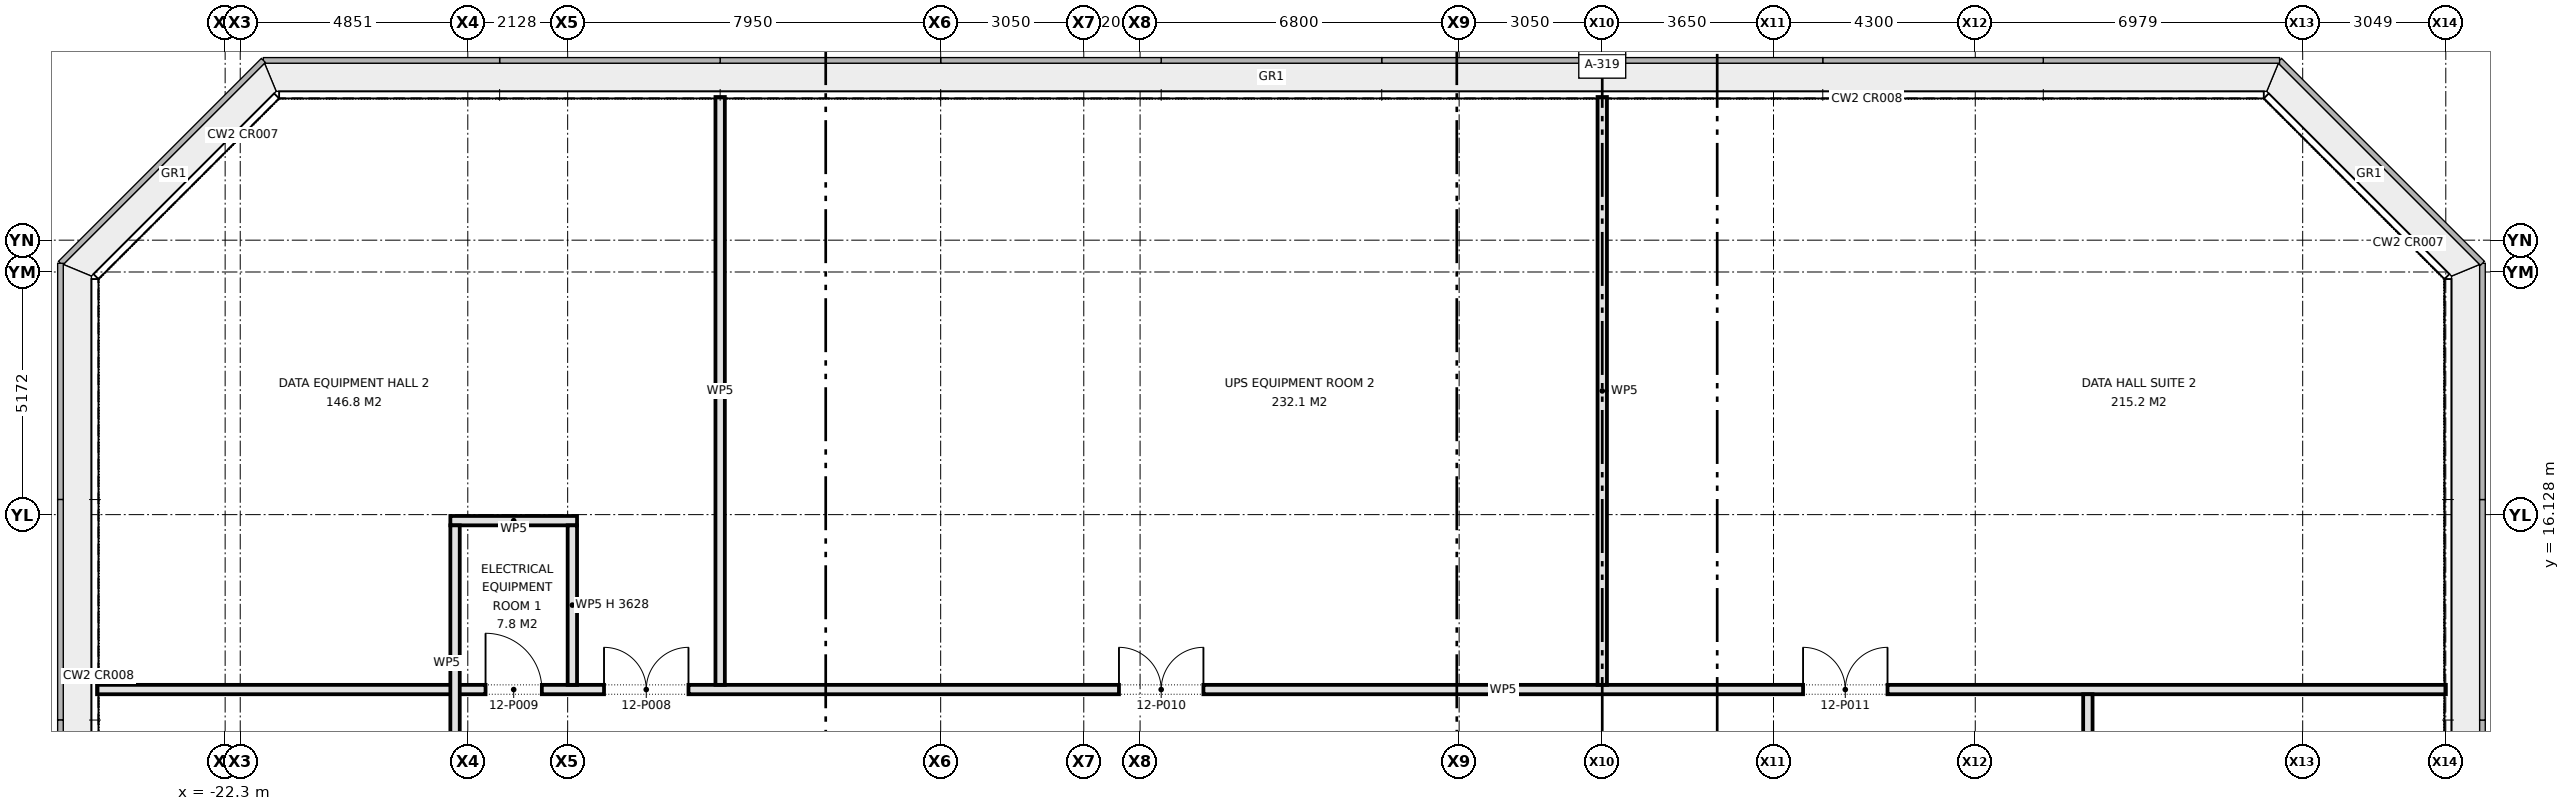
"""IFC4 building model, lengths in metres.
Left out: names, types, materials, properties, quantities, classifications, styles, units other than length and angle.
Written with IfcOpenShell. Run it as: python <this file> out.ifc"""

import sys

from ifc_helpers import new_model, si_unit, direction, frame, frame_2d, origin, place, context, subcontext, project, spatial, rectangle, extrude, element, fill, save


model = new_model("IFC4")
c1 = context("Model", 3, precision=1e-05, world=origin(), true_north=direction((0.0, 1.0)))
c2 = subcontext(c1, "Body", "Model", "MODEL_VIEW")
j1 = project(units=[si_unit("LENGTHUNIT", "METRE"), si_unit("PLANEANGLEUNIT", "RADIAN")], contexts=[c1])
p1 = place(None, origin())
s1 = spatial("IfcSite", under=j1, at=p1, CompositionType="ELEMENT")
p2 = place(p1, origin())
s2 = spatial("IfcBuilding", under=s1, at=p2, CompositionType="ELEMENT")
p3 = place(p2, frame((0.0, 0.0, 54.5)))
s3 = spatial("IfcBuildingStorey", under=s2, at=p3, CompositionType="ELEMENT", Elevation=54.5)
p4 = place(p3, frame((-25.03, 12.4, 0.0), z_axis=(0.0, 0.0, 1.0), x_axis=(1.0, 0.0, 0.0)))
e1 = element("IfcWall", 1, at=p4, inside=s3, PredefinedType="PARTITIONING", context=c2, shape_type="SweptSolid", body=[
    extrude(rectangle(XDim=50.06, YDim=0.2, at=frame_2d((25.03, 0.0))), origin(), (0.0, 0.0, 1.0), 4.575),
])
p5 = place(p4, frame((10.805, 0.0, 0.0)))
e2 = element("IfcOpeningElement", 2, at=p5, cuts=e1, PredefinedType="OPENING", context=c2, shape_type="SweptSolid", body=[
    extrude(rectangle(XDim=1.8, YDim=2.1, at=frame_2d((0.9, 1.05))), frame((0.0, 0.11, 0.0), z_axis=(0.0, -1.0, 0.0), x_axis=(1.0, 0.0, 0.0)), (0.0, 0.0, 1.0), 0.22),
])
p6 = place(p4, frame((8.28, 0.0, 0.0)))
e3 = element("IfcOpeningElement", 3, at=p6, cuts=e1, PredefinedType="OPENING", context=c2, shape_type="SweptSolid", body=[
    extrude(rectangle(XDim=1.2, YDim=2.1, at=frame_2d((0.6, 1.05))), frame((0.0, 0.11, 0.0), z_axis=(0.0, -1.0, 0.0), x_axis=(1.0, 0.0, 0.0)), (0.0, 0.0, 1.0), 0.22),
])
p7 = place(p4, frame((21.78, 0.0, 0.0)))
e4 = element("IfcOpeningElement", 4, at=p7, cuts=e1, PredefinedType="OPENING", context=c2, shape_type="SweptSolid", body=[
    extrude(rectangle(XDim=1.8, YDim=2.1, at=frame_2d((0.9, 1.05))), frame((0.0, 0.11, 0.0), z_axis=(0.0, -1.0, 0.0), x_axis=(1.0, 0.0, 0.0)), (0.0, 0.0, 1.0), 0.22),
])
p8 = place(p4, frame((36.36, 0.0, 0.0)))
e5 = element("IfcOpeningElement", 5, at=p8, cuts=e1, PredefinedType="OPENING", context=c2, shape_type="SweptSolid", body=[
    extrude(rectangle(XDim=1.8, YDim=2.1, at=frame_2d((0.9, 1.05))), frame((0.0, 0.11, 0.0), z_axis=(0.0, -1.0, 0.0), x_axis=(1.0, 0.0, 0.0)), (0.0, 0.0, 1.0), 0.22),
])
p9 = place(p3, frame((-17.5, 16.0, 0.0), z_axis=(0.0, 0.0, 1.0), x_axis=(1.0, 0.0, 0.0)))
e6 = element("IfcWall", 6, at=p9, inside=s3, PredefinedType="PARTITIONING", context=c2, shape_type="SweptSolid", body=[
    extrude(rectangle(XDim=2.7, YDim=0.2, at=frame_2d((1.35, 0.0))), origin(), (0.0, 0.0, 1.0), 4.575),
])
p10 = place(p3, frame((17.4, -12.3, 0.0), z_axis=(0.0, 0.0, 1.0), x_axis=(0.0, 1.0, 0.0)))
e7 = element("IfcWall", 7, at=p10, inside=s3, PredefinedType="PARTITIONING", context=c2, shape_type="SweptSolid", body=[
    extrude(rectangle(XDim=24.6, YDim=0.2, at=frame_2d((12.3, 0.0))), origin(), (0.0, 0.0, 1.0), 4.575),
])
p11 = place(p10, frame((4.025, 0.0, 0.0)))
e8 = element("IfcOpeningElement", 8, at=p11, cuts=e7, PredefinedType="OPENING", context=c2, shape_type="SweptSolid", body=[
    extrude(rectangle(XDim=1.8, YDim=2.1, at=frame_2d((0.9, 1.05))), frame((0.0, 0.11, 0.0), z_axis=(0.0, -1.0, 0.0), x_axis=(1.0, 0.0, 0.0)), (0.0, 0.0, 1.0), 0.22),
])
p12 = place(p10, frame((14.05, 0.0, 0.0)))
e9 = element("IfcOpeningElement", 9, at=p12, cuts=e7, PredefinedType="OPENING", context=c2, shape_type="SweptSolid", body=[
    extrude(rectangle(XDim=1.2, YDim=2.1, at=frame_2d((0.6, 1.05))), frame((0.0, 0.11, 0.0), z_axis=(0.0, -1.0, 0.0), x_axis=(1.0, 0.0, 0.0)), (0.0, 0.0, 1.0), 0.22),
])
p13 = place(p10, frame((21.125, 0.0, 0.0)))
e10 = element("IfcOpeningElement", 10, at=p13, cuts=e7, PredefinedType="OPENING", context=c2, shape_type="SweptSolid", body=[
    extrude(rectangle(XDim=1.8, YDim=2.1, at=frame_2d((0.9, 1.05))), frame((0.0, 0.11, 0.0), z_axis=(0.0, -1.0, 0.0), x_axis=(1.0, 0.0, 0.0)), (0.0, 0.0, 1.0), 0.22),
])
for number, where, z_axis, x_axis in (
    (11, (7.05, 12.5, 0.0), (0.0, 0.0, 1.0), (0.0, 1.0, 0.0)),
    (12, (-11.75, 12.5, 0.0), (0.0, 0.0, 1.0), (0.0, 1.0, 0.0)),
):
    element("IfcWall", number, at=place(p3, frame(where, z_axis=z_axis, x_axis=x_axis)), inside=s3, PredefinedType="PARTITIONING", context=c2, shape_type="SweptSolid", body=[
        extrude(rectangle(XDim=12.53, YDim=0.2, at=frame_2d((6.265, 0.0))), origin(), (0.0, 0.0, 1.0), 4.575),
    ])
p14 = place(p3, frame((-14.9, 12.5, 0.0), z_axis=(0.0, 0.0, 1.0), x_axis=(0.0, 1.0, 0.0)))
e13 = element("IfcWall", 13, at=p14, inside=s3, PredefinedType="PARTITIONING", context=c2, shape_type="SweptSolid", body=[
    extrude(rectangle(XDim=3.4, YDim=0.2, at=frame_2d((1.7, 0.0))), origin(), (0.0, 0.0, 1.0), 3.628),
])
p15 = place(p3, frame((-17.4, -12.3, 0.0), z_axis=(0.0, 0.0, 1.0), x_axis=(0.0, 1.0, 0.0)))
e14 = element("IfcWall", 14, at=p15, inside=s3, PredefinedType="PARTITIONING", context=c2, shape_type="SweptSolid", body=[
    extrude(rectangle(XDim=28.2, YDim=0.2, at=frame_2d((14.1, 0.0))), origin(), (0.0, 0.0, 1.0), 4.575),
])
p16 = place(p15, frame((4.025, 0.0, 0.0)))
e15 = element("IfcOpeningElement", 15, at=p16, cuts=e14, PredefinedType="OPENING", context=c2, shape_type="SweptSolid", body=[
    extrude(rectangle(XDim=1.8, YDim=2.1, at=frame_2d((0.9, 1.05))), frame((0.0, 0.11, 0.0), z_axis=(0.0, -1.0, 0.0), x_axis=(1.0, 0.0, 0.0)), (0.0, 0.0, 1.0), 0.22),
])
p17 = place(p15, frame((20.525, 0.0, 0.0)))
e16 = element("IfcOpeningElement", 16, at=p17, cuts=e14, PredefinedType="OPENING", context=c2, shape_type="SweptSolid", body=[
    extrude(rectangle(XDim=1.8, YDim=2.1, at=frame_2d((0.9, 1.05))), frame((0.0, 0.11, 0.0), z_axis=(0.0, -1.0, 0.0), x_axis=(1.0, 0.0, 0.0)), (0.0, 0.0, 1.0), 0.22),
])
p18 = place(p15, frame((10.95, 0.0, 0.0)))
e17 = element("IfcOpeningElement", 17, at=p18, cuts=e14, PredefinedType="OPENING", context=c2, shape_type="SweptSolid", body=[
    extrude(rectangle(XDim=1.0, YDim=2.1, at=frame_2d((0.5, 1.05))), frame((0.0, 0.11, 0.0), z_axis=(0.0, -1.0, 0.0), x_axis=(1.0, 0.0, 0.0)), (0.0, 0.0, 1.0), 0.22),
])
p19 = place(p15, frame((13.95, 0.0, 0.0)))
e18 = element("IfcOpeningElement", 18, at=p19, cuts=e14, PredefinedType="OPENING", context=c2, shape_type="SweptSolid", body=[
    extrude(rectangle(XDim=1.0, YDim=2.1, at=frame_2d((0.5, 1.05))), frame((0.0, 0.11, 0.0), z_axis=(0.0, -1.0, 0.0), x_axis=(1.0, 0.0, 0.0)), (0.0, 0.0, 1.0), 0.22),
])
p20 = place(p15, frame((16.55, 0.0, 0.0)))
e19 = element("IfcOpeningElement", 19, at=p20, cuts=e14, PredefinedType="OPENING", context=c2, shape_type="SweptSolid", body=[
    extrude(rectangle(XDim=1.0, YDim=2.1, at=frame_2d((0.5, 1.05))), frame((0.0, 0.11, 0.0), z_axis=(0.0, -1.0, 0.0), x_axis=(1.0, 0.0, 0.0)), (0.0, 0.0, 1.0), 0.22),
])
p21 = place(p5, origin())
e20 = element("IfcDoor", 20, at=p21, inside=s3, OperationType="DOUBLE_DOOR_SINGLE_SWING", PredefinedType="DOOR", context=c2, shape_type="SweptSolid", body=[
    extrude(rectangle(XDim=1.8, YDim=2.1, at=frame_2d((0.9, 1.05))), frame((0.0, 0.025, 0.0), z_axis=(0.0, -1.0, 0.0), x_axis=(1.0, 0.0, 0.0)), (0.0, 0.0, 1.0), 0.05),
])
fill(e2, e20)
p22 = place(p6, origin())
e21 = element("IfcDoor", 21, at=p22, inside=s3, OperationType="SINGLE_SWING_LEFT", PredefinedType="DOOR", context=c2, shape_type="SweptSolid", body=[
    extrude(rectangle(XDim=1.2, YDim=2.1, at=frame_2d((0.6, 1.05))), frame((0.0, 0.025, 0.0), z_axis=(0.0, -1.0, 0.0), x_axis=(1.0, 0.0, 0.0)), (0.0, 0.0, 1.0), 0.05),
])
fill(e3, e21)
p23 = place(p7, origin())
e22 = element("IfcDoor", 22, at=p23, inside=s3, OperationType="DOUBLE_DOOR_SINGLE_SWING", PredefinedType="DOOR", context=c2, shape_type="SweptSolid", body=[
    extrude(rectangle(XDim=1.8, YDim=2.1, at=frame_2d((0.9, 1.05))), frame((0.0, 0.025, 0.0), z_axis=(0.0, -1.0, 0.0), x_axis=(1.0, 0.0, 0.0)), (0.0, 0.0, 1.0), 0.05),
])
fill(e4, e22)
p24 = place(p8, origin())
e23 = element("IfcDoor", 23, at=p24, inside=s3, OperationType="DOUBLE_DOOR_SINGLE_SWING", PredefinedType="DOOR", context=c2, shape_type="SweptSolid", body=[
    extrude(rectangle(XDim=1.8, YDim=2.1, at=frame_2d((0.9, 1.05))), frame((0.0, 0.025, 0.0), z_axis=(0.0, -1.0, 0.0), x_axis=(1.0, 0.0, 0.0)), (0.0, 0.0, 1.0), 0.05),
])
fill(e5, e23)
save(model, sys.argv[1])
